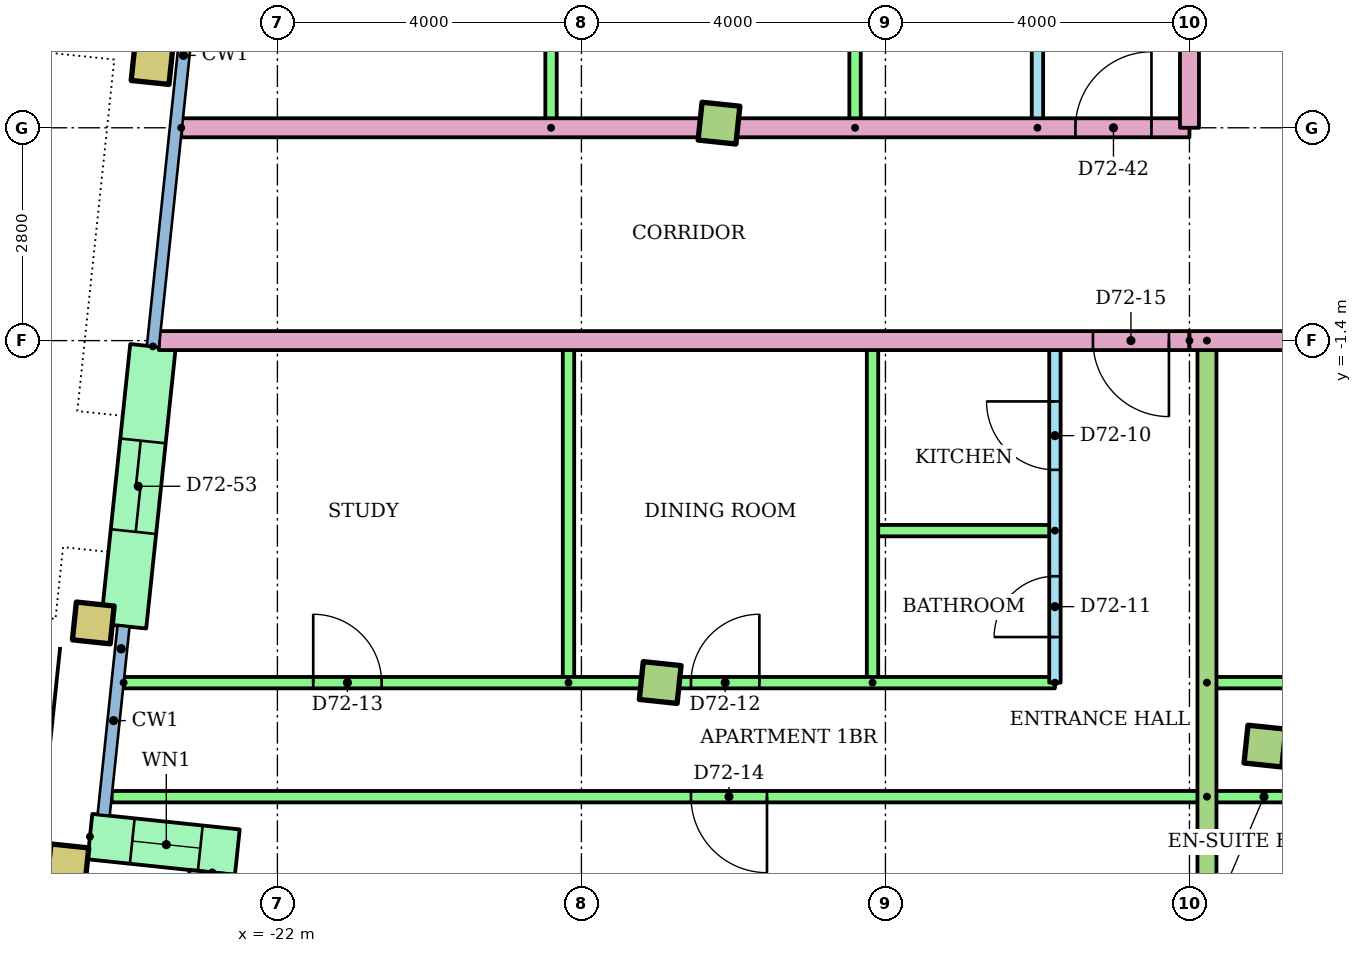
"""IFC4 building model, lengths in metres.
Left out: names, types, materials, properties, quantities, classifications, styles, units other than length and angle.
Written with IfcOpenShell. Run it as: python <this file> out.ifc"""

import sys

from ifc_helpers import new_model, si_unit, direction, frame, frame_2d, origin, origin_2d, place, context, subcontext, project, spatial, rectangle, hollow_rectangle, extrude, element, fill, save


model = new_model("IFC4")
c1 = context("Model", 3, precision=1e-05, world=origin(), true_north=direction((0.0, 1.0)))
c2 = subcontext(c1, "Body", "Model", "MODEL_VIEW")
j1 = project(units=[si_unit("LENGTHUNIT", "METRE"), si_unit("PLANEANGLEUNIT", "RADIAN")], contexts=[c1])
p1 = place(None, origin())
s1 = spatial("IfcSite", under=j1, at=p1, CompositionType="ELEMENT")
p2 = place(p1, origin())
s2 = spatial("IfcBuilding", under=s1, at=p2, CompositionType="ELEMENT")
p3 = place(p2, frame((0.0, 0.0, 275.5)))
s3 = spatial("IfcBuildingStorey", under=s2, at=p3, CompositionType="ELEMENT", Elevation=275.5)
for number, where, z_axis, x_axis in (
    (1, (-24.757, -8.297, 0.0), (0.0, 0.0, 1.0), (0.995, -0.105, 0.0)),
    (2, (-24.423, -5.115, 0.0), (0.0, 0.0, 1.0), (0.995, -0.105, 0.0)),
):
    element("IfcColumn", number, at=place(p3, frame(where, z_axis=z_axis, x_axis=x_axis)), inside=s3, PredefinedType="COLUMN", context=c2, shape_type="SweptSolid", body=[
        extrude(hollow_rectangle(XDim=0.5, YDim=0.5, WallThickness=0.025, at=origin_2d()), origin(), (0.0, 0.0, 1.0), 3.2),
    ])
for number, where, z_axis, x_axis in (
    (3, (-16.964, -5.898, 0.0), (0.0, 0.0, 1.0), (0.995, -0.105, 0.0)),
    (4, (-9.007, -6.735, 0.0), (0.0, 0.0, 1.0), (0.995, -0.105, 0.0)),
):
    element("IfcColumn", number, at=place(p3, frame(where, z_axis=z_axis, x_axis=x_axis)), inside=s3, PredefinedType="COLUMN", context=c2, shape_type="SweptSolid", body=[
        extrude(rectangle(XDim=0.5, YDim=0.5, at=origin_2d()), origin(), (0.0, 0.0, 1.0), 3.2),
    ])
p4 = place(p3, frame((-23.649, 2.245, 0.0), z_axis=(0.0, 0.0, 1.0), x_axis=(0.994521895368, -0.104528463268, 0.0)))
e5 = element("IfcColumn", 5, at=p4, inside=s3, PredefinedType="COLUMN", context=c2, shape_type="SweptSolid", body=[
    extrude(hollow_rectangle(XDim=0.5, YDim=0.5, WallThickness=0.025, at=origin_2d()), origin(), (0.0, 0.0, 1.0), 3.2),
])
p5 = place(p3, frame((-16.19, 1.461, 0.0), z_axis=(0.0, 0.0, 1.0), x_axis=(0.994521895368, -0.104528463268, 0.0)))
e6 = element("IfcColumn", 6, at=p5, inside=s3, PredefinedType="COLUMN", context=c2, shape_type="SweptSolid", body=[
    extrude(rectangle(XDim=0.5, YDim=0.5, at=origin_2d()), origin(), (0.0, 0.0, 1.0), 3.2),
])
p6 = place(p3, frame((-23.638, -1.476, 0.0), z_axis=(0.0, 0.0, 1.0), x_axis=(-0.104513052986, -0.994523514933, 0.0)))
e7 = element("IfcWall", 7, at=p6, inside=s3, PredefinedType="STANDARD", context=c2, shape_type="SweptSolid", body=[
    extrude(rectangle(XDim=3.7, YDim=0.6, at=frame_2d((1.85, 0.0))), origin(), (0.0, 0.0, 1.0), 2.92),
])
p7 = place(p6, frame((1.25, 0.0, 0.0)))
e8 = element("IfcOpeningElement", 8, at=p7, cuts=e7, PredefinedType="OPENING", context=c2, shape_type="SweptSolid", body=[
    extrude(rectangle(XDim=1.2, YDim=2.1, at=frame_2d((0.6, 1.05))), frame((0.0, 0.31, 0.0), z_axis=(0.0, -1.0, 0.0), x_axis=(1.0, 0.0, 0.0)), (0.0, 0.0, 1.0), 0.62),
])
p8 = place(p3, frame((-24.467, -7.925, 0.0), z_axis=(0.0, 0.0, 1.0), x_axis=(0.994521219184, -0.104534896528, 0.0)))
e9 = element("IfcWall", 9, at=p8, inside=s3, PredefinedType="STANDARD", context=c2, shape_type="SweptSolid", body=[
    extrude(rectangle(XDim=1.95, YDim=0.6, at=frame_2d((0.975, 0.0))), origin(), (0.0, 0.0, 1.0), 2.92),
])
p9 = place(p8, frame((0.56, 0.0, 0.9)))
e10 = element("IfcOpeningElement", 10, at=p9, cuts=e9, PredefinedType="OPENING", context=c2, shape_type="SweptSolid", body=[
    extrude(rectangle(XDim=0.9, YDim=1.5, at=frame_2d((0.45, 0.75))), frame((0.0, 0.31, 0.0), z_axis=(0.0, -1.0, 0.0), x_axis=(1.0, 0.0, 0.0)), (0.0, 0.0, 1.0), 0.62),
])
p10 = place(p3, frame((-22.857, -8.396, 0.0), z_axis=(0.0, 0.0, 1.0), x_axis=(-0.104444712852, -0.994530694326, 0.0)))
e11 = element("IfcWall", 11, at=p10, inside=s3, PredefinedType="STANDARD", context=c2, shape_type="SweptSolid", body=[
    extrude(rectangle(XDim=0.9, YDim=0.6, at=frame_2d((0.45, 0.0))), origin(), (0.0, 0.0, 1.0), 2.92),
])
p11 = place(p3, frame((-11.77, -5.9, 0.0), z_axis=(0.0, 0.0, 1.0), x_axis=(0.0, 1.0, 0.0)))
e12 = element("IfcWall", 12, at=p11, inside=s3, PredefinedType="PARTITIONING", context=c2, shape_type="SweptSolid", body=[
    extrude(rectangle(XDim=4.5, YDim=0.15, at=frame_2d((2.25, 0.0))), origin(), (0.0, 0.0, 1.0), 2.4),
])
p12 = place(p11, frame((2.8, 0.0, 0.0)))
e13 = element("IfcOpeningElement", 13, at=p12, cuts=e12, PredefinedType="OPENING", context=c2, shape_type="SweptSolid", body=[
    extrude(rectangle(XDim=0.9, YDim=2.1, at=frame_2d((0.45, 1.05))), frame((0.0, 0.085, 0.0), z_axis=(0.0, -1.0, 0.0), x_axis=(1.0, 0.0, 0.0)), (0.0, 0.0, 1.0), 0.17),
])
p13 = place(p11, frame((0.6, 0.0, 0.0)))
e14 = element("IfcOpeningElement", 14, at=p13, cuts=e12, PredefinedType="OPENING", context=c2, shape_type="SweptSolid", body=[
    extrude(rectangle(XDim=0.8, YDim=2.1, at=frame_2d((0.4, 1.05))), frame((0.0, 0.085, 0.0), z_axis=(0.0, -1.0, 0.0), x_axis=(1.0, 0.0, 0.0)), (0.0, 0.0, 1.0), 0.17),
])
p14 = place(p3, frame((-11.77, -3.9, 0.0), z_axis=(0.0, 0.0, 1.0), x_axis=(-1.0, 0.0, 0.0)))
e15 = element("IfcWall", 15, at=p14, inside=s3, PredefinedType="PARTITIONING", context=c2, shape_type="SweptSolid", body=[
    extrude(rectangle(XDim=2.4, YDim=0.15, at=frame_2d((1.2, 0.0))), origin(), (0.0, 0.0, 1.0), 2.4),
])
for number, where, z_axis, x_axis in (
    (16, (-14.17, -5.9, 0.0), (0.0, 0.0, 1.0), (0.0, 1.0, 0.0)),
    (17, (-18.17, -5.9, 0.0), (0.0, 0.0, 1.0), (0.0, 1.0, 0.0)),
):
    element("IfcWall", number, at=place(p3, frame(where, z_axis=z_axis, x_axis=x_axis)), inside=s3, PredefinedType="PARTITIONING", context=c2, shape_type="SweptSolid", body=[
        extrude(rectangle(XDim=4.5, YDim=0.15, at=frame_2d((2.25, 0.0))), origin(), (0.0, 0.0, 1.0), 2.4),
    ])
p15 = place(p3, frame((-24.023, -5.9, 0.0)))
e18 = element("IfcWall", 18, at=p15, inside=s3, PredefinedType="PARTITIONING", context=c2, shape_type="SweptSolid", body=[
    extrude(rectangle(XDim=12.253, YDim=0.15, at=frame_2d((6.127, 0.0))), origin(), (0.0, 0.0, 1.0), 2.4),
])
p16 = place(p15, frame((7.465, 0.0, 0.0)))
e19 = element("IfcOpeningElement", 19, at=p16, cuts=e18, PredefinedType="OPENING", context=c2, shape_type="SweptSolid", body=[
    extrude(rectangle(XDim=0.9, YDim=2.1, at=frame_2d((0.45, 1.05))), frame((0.0, 0.085, 0.0), z_axis=(0.0, -1.0, 0.0), x_axis=(1.0, 0.0, 0.0)), (0.0, 0.0, 1.0), 0.17),
])
p17 = place(p15, frame((2.494, 0.0, 0.0)))
e20 = element("IfcOpeningElement", 20, at=p17, cuts=e18, PredefinedType="OPENING", context=c2, shape_type="SweptSolid", body=[
    extrude(rectangle(XDim=0.9, YDim=2.1, at=frame_2d((0.45, 1.05))), frame((0.0, 0.085, 0.0), z_axis=(0.0, -1.0, 0.0), x_axis=(1.0, 0.0, 0.0)), (0.0, 0.0, 1.0), 0.17),
])
p18 = place(p3, frame((-9.77, -7.4, 0.0), z_axis=(0.0, 0.0, 1.0), x_axis=(-1.0, 0.0, 0.0)))
e21 = element("IfcWall", 21, at=p18, inside=s3, PredefinedType="PARTITIONING", context=c2, shape_type="SweptSolid", body=[
    extrude(rectangle(XDim=14.411, YDim=0.15, at=frame_2d((7.206, 0.0))), origin(), (0.0, 0.0, 1.0), 2.4),
])
p19 = place(p18, frame((5.789, 0.0, 0.0)))
e22 = element("IfcOpeningElement", 22, at=p19, cuts=e21, PredefinedType="OPENING", context=c2, shape_type="SweptSolid", body=[
    extrude(rectangle(XDim=1.0, YDim=2.1, at=frame_2d((0.5, 1.05))), frame((0.0, 0.085, 0.0), z_axis=(0.0, -1.0, 0.0), x_axis=(1.0, 0.0, 0.0)), (0.0, 0.0, 1.0), 0.17),
])
p20 = place(p3, frame((-9.77, -5.9, 0.0)))
e23 = element("IfcWall", 23, at=p20, inside=s3, PredefinedType="PARTITIONING", context=c2, shape_type="SweptSolid", body=[
    extrude(rectangle(XDim=13.912, YDim=0.15, at=frame_2d((6.956, 0.0))), origin(), (0.0, 0.0, 1.0), 2.4),
])
p21 = place(p20, frame((9.562, 0.0, 0.0)))
e24 = element("IfcOpeningElement", 24, at=p21, cuts=e23, PredefinedType="OPENING", context=c2, shape_type="SweptSolid", body=[
    extrude(rectangle(XDim=0.9, YDim=2.1, at=frame_2d((0.45, 1.05))), frame((0.0, 0.085, 0.0), z_axis=(0.0, -1.0, 0.0), x_axis=(1.0, 0.0, 0.0)), (0.0, 0.0, 1.0), 0.17),
])
p22 = place(p20, frame((6.187, 0.0, 0.0)))
e25 = element("IfcOpeningElement", 25, at=p22, cuts=e23, PredefinedType="OPENING", context=c2, shape_type="SweptSolid", body=[
    extrude(rectangle(XDim=0.9, YDim=2.1, at=frame_2d((0.45, 1.05))), frame((0.0, 0.085, 0.0), z_axis=(0.0, -1.0, 0.0), x_axis=(1.0, 0.0, 0.0)), (0.0, 0.0, 1.0), 0.17),
])
p23 = place(p20, frame((1.931, 0.0, 0.0)))
e26 = element("IfcOpeningElement", 26, at=p23, cuts=e23, PredefinedType="OPENING", context=c2, shape_type="SweptSolid", body=[
    extrude(rectangle(XDim=0.9, YDim=2.1, at=frame_2d((0.45, 1.05))), frame((0.0, 0.085, 0.0), z_axis=(0.0, -1.0, 0.0), x_axis=(1.0, 0.0, 0.0)), (0.0, 0.0, 1.0), 0.17),
])
p24 = place(p3, frame((6.142, -7.4, 0.0), z_axis=(0.0, 0.0, 1.0), x_axis=(-1.0, 0.0, 0.0)))
e27 = element("IfcWall", 27, at=p24, inside=s3, PredefinedType="PARTITIONING", context=c2, shape_type="SweptSolid", body=[
    extrude(rectangle(XDim=15.912, YDim=0.15, at=frame_2d((7.956, 0.0))), origin(), (0.0, 0.0, 1.0), 2.4),
])
p25 = place(p24, frame((12.252, 0.0, 0.0)))
e28 = element("IfcOpeningElement", 28, at=p25, cuts=e27, PredefinedType="OPENING", context=c2, shape_type="SweptSolid", body=[
    extrude(rectangle(XDim=0.9, YDim=2.1, at=frame_2d((0.45, 1.05))), frame((0.0, 0.085, 0.0), z_axis=(0.0, -1.0, 0.0), x_axis=(1.0, 0.0, 0.0)), (0.0, 0.0, 1.0), 0.17),
])
p26 = place(p24, frame((9.495, 0.0, 0.0)))
e29 = element("IfcOpeningElement", 29, at=p26, cuts=e27, PredefinedType="OPENING", context=c2, shape_type="SweptSolid", body=[
    extrude(rectangle(XDim=0.9, YDim=2.1, at=frame_2d((0.45, 1.05))), frame((0.0, 0.085, 0.0), z_axis=(0.0, -1.0, 0.0), x_axis=(1.0, 0.0, 0.0)), (0.0, 0.0, 1.0), 0.17),
])
p27 = place(p24, frame((3.478, 0.0, 0.0)))
e30 = element("IfcOpeningElement", 30, at=p27, cuts=e27, PredefinedType="OPENING", context=c2, shape_type="SweptSolid", body=[
    extrude(rectangle(XDim=1.0, YDim=2.1, at=frame_2d((0.5, 1.05))), frame((0.0, 0.085, 0.0), z_axis=(0.0, -1.0, 0.0), x_axis=(1.0, 0.0, 0.0)), (0.0, 0.0, 1.0), 0.17),
])
p28 = place(p3, frame((-9.77, -1.4, 0.0), z_axis=(0.0, 0.0, 1.0), x_axis=(0.0, -1.0, 0.0)))
e31 = element("IfcWall", 31, at=p28, inside=s3, PredefinedType="PARTITIONING", context=c2, shape_type="SweptSolid", body=[
    extrude(rectangle(XDim=12.504, YDim=0.25, at=frame_2d((6.252, 0.0))), origin(), (0.0, 0.0, 1.0), 2.4),
])
p29 = place(p3, frame((-10.0, -1.4, 0.0), z_axis=(0.0, 0.0, 1.0), x_axis=(-1.0, 0.0, 0.0)))
e32 = element("IfcWall", 32, at=p29, inside=s3, PredefinedType="PARTITIONING", context=c2, shape_type="SweptSolid", body=[
    extrude(rectangle(XDim=13.56, YDim=0.25, at=frame_2d((6.78, 0.0))), origin(), (0.0, 0.0, 1.0), 2.4),
])
p30 = place(p29, frame((0.27, 0.0, 0.0)))
e33 = element("IfcOpeningElement", 33, at=p30, cuts=e32, PredefinedType="OPENING", context=c2, shape_type="SweptSolid", body=[
    extrude(rectangle(XDim=1.0, YDim=2.1, at=frame_2d((0.5, 1.05))), frame((0.0, 0.135, 0.0), z_axis=(0.0, -1.0, 0.0), x_axis=(1.0, 0.0, 0.0)), (0.0, 0.0, 1.0), 0.27),
])
p31 = place(p3, frame((-12.0, 1.4, 0.0), z_axis=(0.0, 0.0, 1.0), x_axis=(0.0, 1.0, 0.0)))
e34 = element("IfcWall", 34, at=p31, inside=s3, PredefinedType="PARTITIONING", context=c2, shape_type="SweptSolid", body=[
    extrude(rectangle(XDim=11.5, YDim=0.15, at=frame_2d((5.75, 0.0))), origin(), (0.0, 0.0, 1.0), 2.4),
])
p32 = place(p31, frame((2.675, 0.0, 0.0)))
e35 = element("IfcOpeningElement", 35, at=p32, cuts=e34, PredefinedType="OPENING", context=c2, shape_type="SweptSolid", body=[
    extrude(rectangle(XDim=0.9, YDim=2.1, at=frame_2d((0.45, 1.05))), frame((0.0, 0.085, 0.0), z_axis=(0.0, -1.0, 0.0), x_axis=(1.0, 0.0, 0.0)), (0.0, 0.0, 1.0), 0.17),
])
p33 = place(p31, frame((8.475, 0.0, 0.0)))
e36 = element("IfcOpeningElement", 36, at=p33, cuts=e34, PredefinedType="OPENING", context=c2, shape_type="SweptSolid", body=[
    extrude(rectangle(XDim=0.8, YDim=2.1, at=frame_2d((0.4, 1.05))), frame((0.0, 0.085, 0.0), z_axis=(0.0, -1.0, 0.0), x_axis=(1.0, 0.0, 0.0)), (0.0, 0.0, 1.0), 0.17),
])
for number, where, z_axis, x_axis in (
    (37, (-14.4, 1.4, 0.0), (0.0, 0.0, 1.0), (0.0, 1.0, 0.0)),
    (38, (-18.4, 1.4, 0.0), (0.0, 0.0, 1.0), (0.0, 1.0, 0.0)),
):
    element("IfcWall", number, at=place(p3, frame(where, z_axis=z_axis, x_axis=x_axis)), inside=s3, PredefinedType="PARTITIONING", context=c2, shape_type="SweptSolid", body=[
        extrude(rectangle(XDim=11.5, YDim=0.15, at=frame_2d((5.75, 0.0))), origin(), (0.0, 0.0, 1.0), 2.4),
    ])
p34 = place(p3, frame((-23.265, 1.4, 0.0)))
e39 = element("IfcWall", 39, at=p34, inside=s3, PredefinedType="PARTITIONING", context=c2, shape_type="SweptSolid", body=[
    extrude(rectangle(XDim=13.265, YDim=0.25, at=frame_2d((6.633, 0.0))), origin(), (0.0, 0.0, 1.0), 2.4),
])
p35 = place(p34, frame((11.765, 0.0, 0.0)))
e40 = element("IfcOpeningElement", 40, at=p35, cuts=e39, PredefinedType="OPENING", context=c2, shape_type="SweptSolid", body=[
    extrude(rectangle(XDim=1.0, YDim=2.1, at=frame_2d((0.5, 1.05))), frame((0.0, 0.135, 0.0), z_axis=(0.0, -1.0, 0.0), x_axis=(1.0, 0.0, 0.0)), (0.0, 0.0, 1.0), 0.27),
])
p36 = place(p3, frame((10.0, -1.4, 0.0), z_axis=(0.0, 0.0, 1.0), x_axis=(-1.0, 0.0, 0.0)))
e41 = element("IfcWall", 41, at=p36, inside=s3, PredefinedType="PARTITIONING", context=c2, shape_type="SweptSolid", body=[
    extrude(rectangle(XDim=20.0, YDim=0.25, at=frame_2d((10.0, 0.0))), origin(), (0.0, 0.0, 1.0), 2.4),
])
p37 = place(p36, frame((4.358, 0.0, 0.0)))
e42 = element("IfcOpeningElement", 42, at=p37, cuts=e41, PredefinedType="OPENING", context=c2, shape_type="SweptSolid", body=[
    extrude(rectangle(XDim=1.0, YDim=2.1, at=frame_2d((0.5, 1.05))), frame((0.0, 0.135, 0.0), z_axis=(0.0, -1.0, 0.0), x_axis=(1.0, 0.0, 0.0)), (0.0, 0.0, 1.0), 0.27),
])
p38 = place(p36, frame((2.614, 0.0, 0.0)))
e43 = element("IfcOpeningElement", 43, at=p38, cuts=e41, PredefinedType="OPENING", context=c2, shape_type="SweptSolid", body=[
    extrude(rectangle(XDim=0.9, YDim=2.1, at=frame_2d((0.45, 1.05))), frame((0.0, 0.135, 0.0), z_axis=(0.0, -1.0, 0.0), x_axis=(1.0, 0.0, 0.0)), (0.0, 0.0, 1.0), 0.27),
])
p39 = place(p3, frame((-10.0, 3.0, 0.0), z_axis=(0.0, 0.0, 1.0), x_axis=(0.0, -1.0, 0.0)))
e44 = element("IfcWall", 44, at=p39, inside=s3, PredefinedType="PARTITIONING", context=c2, shape_type="SweptSolid", body=[
    extrude(rectangle(XDim=1.6, YDim=0.25, at=frame_2d((0.8, 0.0))), origin(), (0.0, 0.0, 1.0), 2.4),
])
p40 = place(p9, origin())
e45 = element("IfcWindow", 45, at=p40, inside=s3, PartitioningType="SINGLE_PANEL", PredefinedType="WINDOW", context=c2, shape_type="SweptSolid", body=[
    extrude(rectangle(XDim=0.9, YDim=1.5, at=frame_2d((0.45, 0.75))), frame((0.0, 0.03, 0.0), z_axis=(0.0, -1.0, 0.0), x_axis=(1.0, 0.0, 0.0)), (0.0, 0.0, 1.0), 0.06),
])
fill(e10, e45)
p41 = place(p12, origin())
e46 = element("IfcDoor", 46, at=p41, inside=s3, OperationType="SINGLE_SWING_RIGHT", PredefinedType="DOOR", context=c2, shape_type="SweptSolid", body=[
    extrude(rectangle(XDim=0.9, YDim=2.1, at=frame_2d((0.45, 1.05))), frame((0.0, 0.025, 0.0), z_axis=(0.0, -1.0, 0.0), x_axis=(1.0, 0.0, 0.0)), (0.0, 0.0, 1.0), 0.05),
])
fill(e13, e46)
p42 = place(p13, origin())
e47 = element("IfcDoor", 47, at=p42, inside=s3, OperationType="SINGLE_SWING_LEFT", PredefinedType="DOOR", context=c2, shape_type="SweptSolid", body=[
    extrude(rectangle(XDim=0.8, YDim=2.1, at=frame_2d((0.4, 1.05))), frame((0.0, 0.025, 0.0), z_axis=(0.0, -1.0, 0.0), x_axis=(1.0, 0.0, 0.0)), (0.0, 0.0, 1.0), 0.05),
])
fill(e14, e47)
p43 = place(p16, origin())
e48 = element("IfcDoor", 48, at=p43, inside=s3, OperationType="SINGLE_SWING_RIGHT", PredefinedType="DOOR", context=c2, shape_type="SweptSolid", body=[
    extrude(rectangle(XDim=0.9, YDim=2.1, at=frame_2d((0.45, 1.05))), frame((0.0, 0.025, 0.0), z_axis=(0.0, -1.0, 0.0), x_axis=(1.0, 0.0, 0.0)), (0.0, 0.0, 1.0), 0.05),
])
fill(e19, e48)
p44 = place(p17, origin())
e49 = element("IfcDoor", 49, at=p44, inside=s3, OperationType="SINGLE_SWING_LEFT", PredefinedType="DOOR", context=c2, shape_type="SweptSolid", body=[
    extrude(rectangle(XDim=0.9, YDim=2.1, at=frame_2d((0.45, 1.05))), frame((0.0, 0.025, 0.0), z_axis=(0.0, -1.0, 0.0), x_axis=(1.0, 0.0, 0.0)), (0.0, 0.0, 1.0), 0.05),
])
fill(e20, e49)
p45 = place(p19, origin())
e50 = element("IfcDoor", 50, at=p45, inside=s3, OperationType="SINGLE_SWING_LEFT", PredefinedType="DOOR", context=c2, shape_type="SweptSolid", body=[
    extrude(rectangle(XDim=1.0, YDim=2.1, at=frame_2d((0.5, 1.05))), frame((0.0, 0.025, 0.0), z_axis=(0.0, -1.0, 0.0), x_axis=(1.0, 0.0, 0.0)), (0.0, 0.0, 1.0), 0.05),
])
fill(e22, e50)
p46 = place(p30, origin())
e51 = element("IfcDoor", 51, at=p46, inside=s3, OperationType="SINGLE_SWING_LEFT", PredefinedType="DOOR", context=c2, shape_type="SweptSolid", body=[
    extrude(rectangle(XDim=1.0, YDim=2.1, at=frame_2d((0.5, 1.05))), frame((0.0, 0.025, 0.0), z_axis=(0.0, -1.0, 0.0), x_axis=(1.0, 0.0, 0.0)), (0.0, 0.0, 1.0), 0.05),
])
fill(e33, e51)
p47 = place(p35, origin())
e52 = element("IfcDoor", 52, at=p47, inside=s3, OperationType="SINGLE_SWING_RIGHT", PredefinedType="DOOR", context=c2, shape_type="SweptSolid", body=[
    extrude(rectangle(XDim=1.0, YDim=2.1, at=frame_2d((0.5, 1.05))), frame((0.0, 0.025, 0.0), z_axis=(0.0, -1.0, 0.0), x_axis=(1.0, 0.0, 0.0)), (0.0, 0.0, 1.0), 0.05),
])
fill(e40, e52)
p48 = place(p7, origin())
e53 = element("IfcDoor", 53, at=p48, inside=s3, OperationType="SLIDING_TO_LEFT", PredefinedType="DOOR", context=c2, shape_type="SweptSolid", body=[
    extrude(rectangle(XDim=1.2, YDim=2.1, at=frame_2d((0.6, 1.05))), frame((0.0, 0.025, 0.0), z_axis=(0.0, -1.0, 0.0), x_axis=(1.0, 0.0, 0.0)), (0.0, 0.0, 1.0), 0.05),
])
fill(e8, e53)
save(model, sys.argv[1])
